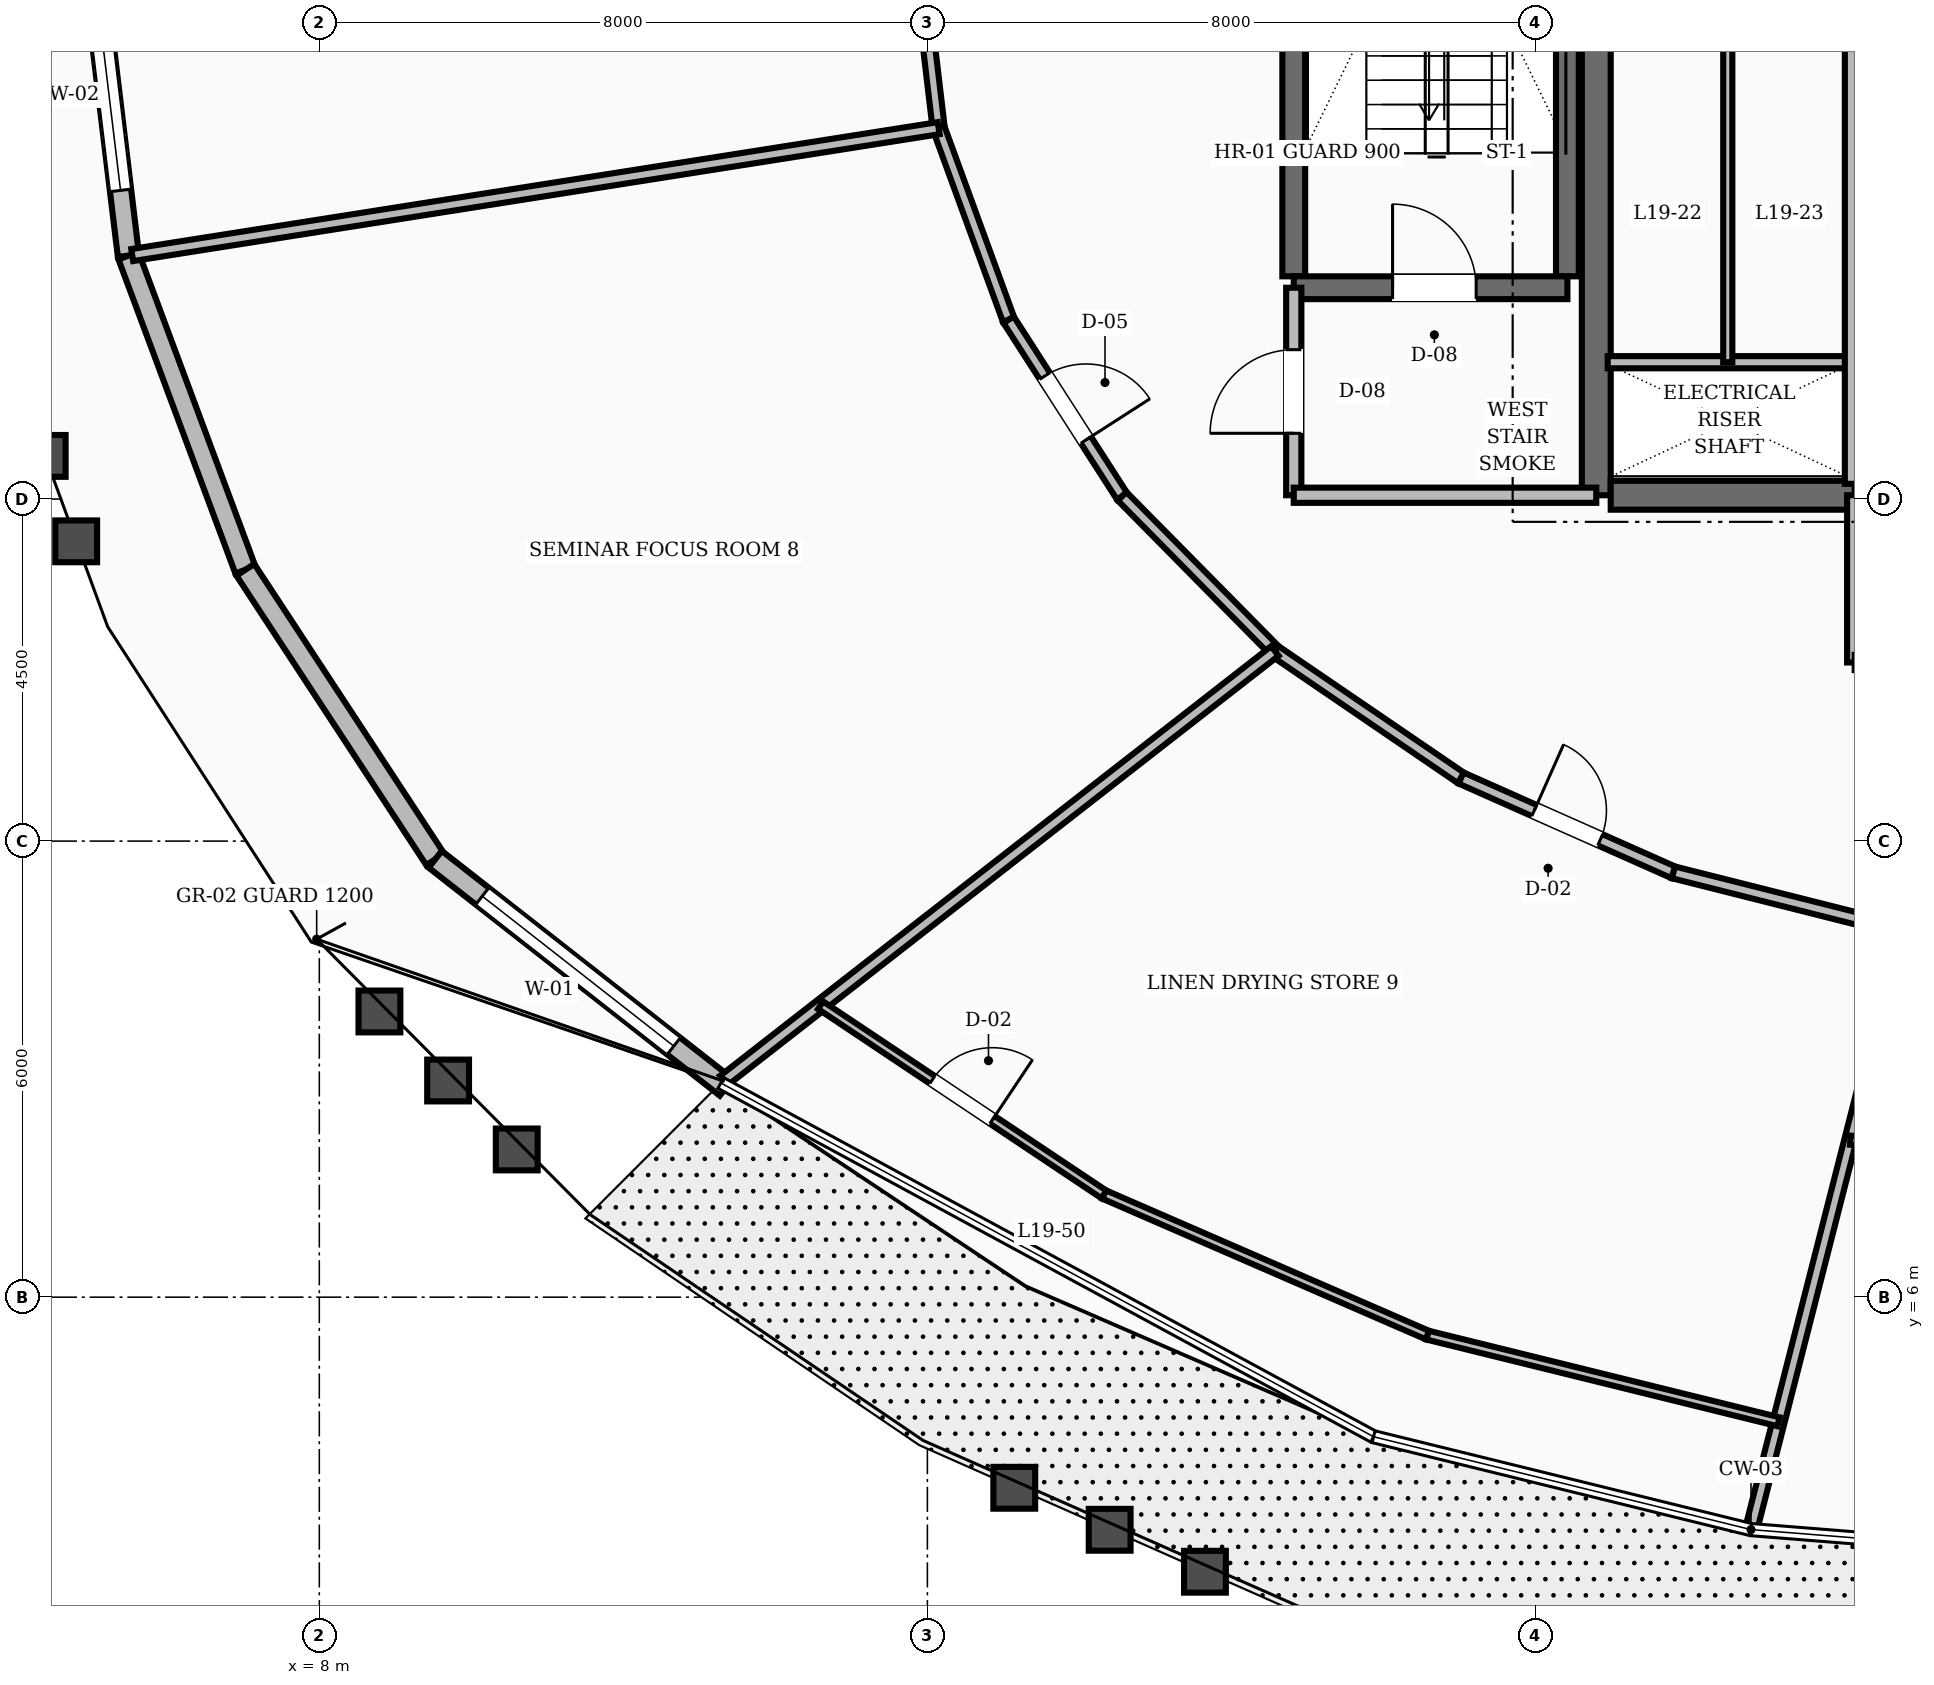
"""IFC4 building model, lengths in metres.
Left out: names, types, materials, properties, quantities, classifications, styles, units other than length and angle.
Written with IfcOpenShell. Run it as: python <this file> out.ifc"""

import sys

from ifc_helpers import new_model, si_unit, direction, frame, frame_2d, origin, place, context, subcontext, project, spatial, rectangle, extrude, element, fill, save


model = new_model("IFC4")
c1 = context("Model", 3, precision=1e-05, world=origin(), true_north=direction((0.0, 1.0)))
c2 = subcontext(c1, "Body", "Model", "MODEL_VIEW")
j1 = project(units=[si_unit("LENGTHUNIT", "METRE"), si_unit("PLANEANGLEUNIT", "RADIAN")], contexts=[c1])
p1 = place(None, origin())
s1 = spatial("IfcSite", under=j1, at=p1, CompositionType="ELEMENT")
p2 = place(p1, origin())
s2 = spatial("IfcBuilding", under=s1, at=p2, CompositionType="ELEMENT")
p3 = place(p2, frame((0.0, 0.0, 77.2)))
s3 = spatial("IfcBuildingStorey", under=s2, at=p3, CompositionType="ELEMENT", Elevation=77.2)
p4 = place(p3, frame((24.8, 16.55, 0.0), z_axis=(0.0, 0.0, 1.0), x_axis=(0.0, 1.0, 0.0)))
e1 = element("IfcWall", 1, at=p4, inside=s3, PredefinedType="SHEAR", context=c2, shape_type="SweptSolid", body=[
    extrude(rectangle(XDim=6.3, YDim=0.38, at=frame_2d((3.15, 0.0))), origin(), (0.0, 0.0, 1.0), 3.6),
])
p5 = place(p3, frame((24.99, 16.55, 0.0), z_axis=(0.0, 0.0, 1.0), x_axis=(1.0, 0.0, 0.0)))
e2 = element("IfcWall", 2, at=p5, inside=s3, PredefinedType="SHEAR", context=c2, shape_type="SweptSolid", body=[
    extrude(rectangle(XDim=3.21, YDim=0.38, at=frame_2d((1.605, 0.0))), origin(), (0.0, 0.0, 1.0), 3.6),
])
for number, where, z_axis, x_axis in (
    (3, (20.82, 19.43, 0.0), (0.0, 0.0, 1.0), (0.0, 1.0, 0.0)),
    (4, (24.42, 19.43, 0.0), (0.0, 0.0, 1.0), (0.0, 1.0, 0.0)),
):
    element("IfcWall", number, at=place(p3, frame(where, z_axis=z_axis, x_axis=x_axis)), inside=s3, PredefinedType="SHEAR", context=c2, shape_type="SweptSolid", body=[
        extrude(rectangle(XDim=8.74, YDim=0.3, at=frame_2d((4.37, 0.0))), origin(), (0.0, 0.0, 1.0), 3.6),
    ])
p6 = place(p3, frame((20.82, 19.28, 0.0), z_axis=(0.0, 0.0, 1.0), x_axis=(1.0, 0.0, 0.0)))
e5 = element("IfcWall", 5, at=p6, inside=s3, PredefinedType="SHEAR", context=c2, shape_type="SweptSolid", body=[
    extrude(rectangle(XDim=3.6, YDim=0.3, at=frame_2d((1.8, 0.0))), origin(), (0.0, 0.0, 1.0), 3.6),
])
p7 = place(p6, frame((1.3, 0.0, 0.0)))
e6 = element("IfcOpeningElement", 6, at=p7, cuts=e5, PredefinedType="OPENING", context=c2, shape_type="SweptSolid", body=[
    extrude(rectangle(XDim=1.1, YDim=2.1, at=frame_2d((0.55, 1.05))), frame((0.0, 0.16, 0.0), z_axis=(0.0, -1.0, 0.0), x_axis=(1.0, 0.0, 0.0)), (0.0, 0.0, 1.0), 0.32),
])
p8 = place(p3, frame((4.969, 24.0, 0.0), z_axis=(0.0, 0.0, 1.0), x_axis=(0.119945698674, -0.992780453761, 0.0)))
e7 = element("IfcWall", 7, at=p8, inside=s3, PredefinedType="STANDARD", context=c2, shape_type="SweptSolid", body=[
    extrude(rectangle(XDim=4.329, YDim=0.28, at=frame_2d((2.165, 0.0))), origin(), (0.0, 0.0, 1.0), 2.71),
])
p9 = place(p8, frame((0.865, 0.0, 0.8)))
e8 = element("IfcOpeningElement", 8, at=p9, cuts=e7, PredefinedType="OPENING", context=c2, shape_type="SweptSolid", body=[
    extrude(rectangle(XDim=2.6, YDim=1.65, at=frame_2d((1.3, 0.825))), frame((0.0, 0.15, 0.0), z_axis=(0.0, -1.0, 0.0), x_axis=(1.0, 0.0, 0.0)), (0.0, 0.0, 1.0), 0.3),
])
p10 = place(p3, frame((5.489, 19.702, 0.0), z_axis=(0.0, 0.0, 1.0), x_axis=(0.348859248306, -0.93717513031, 0.0)))
e9 = element("IfcWall", 9, at=p10, inside=s3, PredefinedType="STANDARD", context=c2, shape_type="SweptSolid", body=[
    extrude(rectangle(XDim=4.41, YDim=0.28, at=frame_2d((2.205, 0.0))), origin(), (0.0, 0.0, 1.0), 2.71),
])
p11 = place(p3, frame((7.027, 15.569, 0.0), z_axis=(0.0, 0.0, 1.0), x_axis=(0.548388300237, -0.836223817027, 0.0)))
e10 = element("IfcWall", 10, at=p11, inside=s3, PredefinedType="STANDARD", context=c2, shape_type="SweptSolid", body=[
    extrude(rectangle(XDim=4.555, YDim=0.28, at=frame_2d((2.277, 0.0))), origin(), (0.0, 0.0, 1.0), 2.71),
])
p12 = place(p3, frame((9.525, 11.76, 0.0), z_axis=(0.0, 0.0, 1.0), x_axis=(0.787323872443, -0.616539633667, 0.0)))
e11 = element("IfcWall", 11, at=p12, inside=s3, PredefinedType="STANDARD", context=c2, shape_type="SweptSolid", body=[
    extrude(rectangle(XDim=4.865, YDim=0.28, at=frame_2d((2.432, 0.0))), origin(), (0.0, 0.0, 1.0), 2.71),
])
p13 = place(p12, frame((0.786, 0.0, 0.8)))
e12 = element("IfcOpeningElement", 12, at=p13, cuts=e11, PredefinedType="OPENING", context=c2, shape_type="SweptSolid", body=[
    extrude(rectangle(XDim=3.2, YDim=1.65, at=frame_2d((1.6, 0.825))), frame((0.0, 0.15, 0.0), z_axis=(0.0, -1.0, 0.0), x_axis=(1.0, 0.0, 0.0)), (0.0, 0.0, 1.0), 0.3),
])
p14 = place(p3, frame((20.82, 16.55, 0.0), z_axis=(0.0, 0.0, 1.0), x_axis=(0.0, 1.0, 0.0)))
e13 = element("IfcWall", 13, at=p14, inside=s3, PredefinedType="SOLIDWALL", context=c2, shape_type="SweptSolid", body=[
    extrude(rectangle(XDim=2.73, YDim=0.2, at=frame_2d((1.365, 0.0))), origin(), (0.0, 0.0, 1.0), 2.71),
])
p15 = place(p14, frame((0.815, 0.0, 0.0)))
e14 = element("IfcOpeningElement", 14, at=p15, cuts=e13, PredefinedType="OPENING", context=c2, shape_type="SweptSolid", body=[
    extrude(rectangle(XDim=1.1, YDim=2.1, at=frame_2d((0.55, 1.05))), frame((0.0, 0.11, 0.0), z_axis=(0.0, -1.0, 0.0), x_axis=(1.0, 0.0, 0.0)), (0.0, 0.0, 1.0), 0.22),
])
p16 = place(p3, frame((20.82, 16.55, 0.0), z_axis=(0.0, 0.0, 1.0), x_axis=(1.0, 0.0, 0.0)))
e15 = element("IfcWall", 15, at=p16, inside=s3, PredefinedType="SOLIDWALL", context=c2, shape_type="SweptSolid", body=[
    extrude(rectangle(XDim=3.98, YDim=0.2, at=frame_2d((1.99, 0.0))), origin(), (0.0, 0.0, 1.0), 2.71),
])
p17 = place(p3, frame((28.2, 14.35, 0.0), z_axis=(0.0, 0.0, 1.0), x_axis=(0.0, 1.0, 0.0)))
e16 = element("IfcWall", 16, at=p17, inside=s3, PredefinedType="SOLIDWALL", context=c2, shape_type="SweptSolid", body=[
    extrude(rectangle(XDim=2.2, YDim=0.2, at=frame_2d((1.1, 0.0))), origin(), (0.0, 0.0, 1.0), 2.71),
])
p18 = place(p3, frame((24.95, 18.3, 0.0), z_axis=(0.0, 0.0, 1.0), x_axis=(1.0, 0.0, 0.0)))
e17 = element("IfcWall", 17, at=p18, inside=s3, PredefinedType="SOLIDWALL", context=c2, shape_type="SweptSolid", body=[
    extrude(rectangle(XDim=3.2, YDim=0.16, at=frame_2d((1.6, 0.0))), origin(), (0.0, 0.0, 1.0), 2.71),
])
p19 = place(p3, frame((28.15, 16.7, 0.0), z_axis=(0.0, 0.0, 1.0), x_axis=(0.0, 1.0, 0.0)))
e18 = element("IfcWall", 18, at=p19, inside=s3, PredefinedType="SOLIDWALL", context=c2, shape_type="SweptSolid", body=[
    extrude(rectangle(XDim=6.05, YDim=0.16, at=frame_2d((3.025, 0.0))), origin(), (0.0, 0.0, 1.0), 2.71),
])
p20 = place(p3, frame((26.53, 18.3, 0.0), z_axis=(0.0, 0.0, 1.0), x_axis=(0.0, 1.0, 0.0)))
e19 = element("IfcWall", 19, at=p20, inside=s3, PredefinedType="PARTITIONING", context=c2, shape_type="SweptSolid", body=[
    extrude(rectangle(XDim=4.45, YDim=0.12, at=frame_2d((2.225, 0.0))), origin(), (0.0, 0.0, 1.0), 2.71),
])
p21 = place(p3, frame((15.838, 24.0, 0.0), z_axis=(0.0, 0.0, 1.0), x_axis=(0.117667763342, -0.993053018459, 0.0)))
e20 = element("IfcWall", 20, at=p21, inside=s3, PredefinedType="SOLIDWALL", context=c2, shape_type="SweptSolid", body=[
    extrude(rectangle(XDim=2.639, YDim=0.16, at=frame_2d((1.32, 0.0))), origin(), (0.0, 0.0, 1.0), 2.71),
])
p22 = place(p3, frame((16.148, 21.379, 0.0), z_axis=(0.0, 0.0, 1.0), x_axis=(0.342882618672, -0.939378257047, 0.0)))
e21 = element("IfcWall", 21, at=p22, inside=s3, PredefinedType="SOLIDWALL", context=c2, shape_type="SweptSolid", body=[
    extrude(rectangle(XDim=2.683, YDim=0.16, at=frame_2d((1.341, 0.0))), origin(), (0.0, 0.0, 1.0), 2.71),
])
p23 = place(p3, frame((17.068, 18.859, 0.0), z_axis=(0.0, 0.0, 1.0), x_axis=(0.540891657444, -0.841092274907, 0.0)))
e22 = element("IfcWall", 22, at=p23, inside=s3, PredefinedType="SOLIDWALL", context=c2, shape_type="SweptSolid", body=[
    extrude(rectangle(XDim=2.761, YDim=0.16, at=frame_2d((1.38, 0.0))), origin(), (0.0, 0.0, 1.0), 2.71),
])
p24 = place(p23, frame((0.881, 0.0, 0.0)))
e23 = element("IfcOpeningElement", 23, at=p24, cuts=e22, PredefinedType="OPENING", context=c2, shape_type="SweptSolid", body=[
    extrude(rectangle(XDim=1.0, YDim=2.1, at=frame_2d((0.5, 1.05))), frame((0.0, 0.09, 0.0), z_axis=(0.0, -1.0, 0.0), x_axis=(1.0, 0.0, 0.0)), (0.0, 0.0, 1.0), 0.18),
])
p25 = place(p3, frame((18.562, 16.537, 0.0), z_axis=(0.0, 0.0, 1.0), x_axis=(0.702569520063, -0.711615113301, 0.0)))
e24 = element("IfcWall", 24, at=p25, inside=s3, PredefinedType="SOLIDWALL", context=c2, shape_type="SweptSolid", body=[
    extrude(rectangle(XDim=2.861, YDim=0.16, at=frame_2d((1.43, 0.0))), origin(), (0.0, 0.0, 1.0), 2.71),
])
p26 = place(p3, frame((20.572, 14.501, 0.0), z_axis=(0.0, 0.0, 1.0), x_axis=(0.826112340767, -0.563505457323, 0.0)))
e25 = element("IfcWall", 25, at=p26, inside=s3, PredefinedType="SOLIDWALL", context=c2, shape_type="SweptSolid", body=[
    extrude(rectangle(XDim=2.965, YDim=0.16, at=frame_2d((1.482, 0.0))), origin(), (0.0, 0.0, 1.0), 2.71),
])
p27 = place(p3, frame((23.021, 12.83, 0.0), z_axis=(0.0, 0.0, 1.0), x_axis=(0.913860932409, -0.406027334321, 0.0)))
e26 = element("IfcWall", 26, at=p27, inside=s3, PredefinedType="SOLIDWALL", context=c2, shape_type="SweptSolid", body=[
    extrude(rectangle(XDim=3.058, YDim=0.16, at=frame_2d((1.529, 0.0))), origin(), (0.0, 0.0, 1.0), 2.71),
])
p28 = place(p27, frame((1.054, 0.0, 0.0)))
e27 = element("IfcOpeningElement", 27, at=p28, cuts=e26, PredefinedType="OPENING", context=c2, shape_type="SweptSolid", body=[
    extrude(rectangle(XDim=0.95, YDim=2.1, at=frame_2d((0.475, 1.05))), frame((0.0, 0.09, 0.0), z_axis=(0.0, -1.0, 0.0), x_axis=(1.0, 0.0, 0.0)), (0.0, 0.0, 1.0), 0.18),
])
p29 = place(p3, frame((25.815, 11.589, 0.0), z_axis=(0.0, 0.0, 1.0), x_axis=(0.969653665365, -0.244482656326, 0.0)))
e28 = element("IfcWall", 28, at=p29, inside=s3, PredefinedType="SOLIDWALL", context=c2, shape_type="SweptSolid", body=[
    extrude(rectangle(XDim=3.127, YDim=0.16, at=frame_2d((1.563, 0.0))), origin(), (0.0, 0.0, 1.0), 2.71),
])
p30 = place(p3, frame((28.847, 10.824, 0.0), z_axis=(0.0, 0.0, 1.0), x_axis=(-0.247229429699, -0.96895696968, 0.0)))
e29 = element("IfcWall", 29, at=p30, inside=s3, PredefinedType="SOLIDWALL", context=c2, shape_type="SweptSolid", body=[
    extrude(rectangle(XDim=8.085, YDim=0.16, at=frame_2d((4.042, 0.0))), origin(), (0.0, 0.0, 1.0), 2.71),
])
p31 = place(p3, frame((28.143, 8.065, 0.0), z_axis=(0.0, 0.0, 1.0), x_axis=(0.996738793215, -0.080695589095, 0.0)))
e30 = element("IfcWall", 30, at=p31, inside=s3, PredefinedType="PARTITIONING", context=c2, shape_type="SweptSolid", body=[
    extrude(rectangle(XDim=3.87, YDim=0.12, at=frame_2d((1.935, 0.0))), origin(), (0.0, 0.0, 1.0), 2.71),
])
p32 = place(p31, frame((1.435, 0.0, 0.0)))
e31 = element("IfcOpeningElement", 31, at=p32, cuts=e30, PredefinedType="OPENING", context=c2, shape_type="SweptSolid", body=[
    extrude(rectangle(XDim=1.0, YDim=2.1, at=frame_2d((0.5, 1.05))), frame((0.0, 0.07, 0.0), z_axis=(0.0, -1.0, 0.0), x_axis=(1.0, 0.0, 0.0)), (0.0, 0.0, 1.0), 0.14),
])
p33 = place(p3, frame((16.148, 21.379, 0.0), z_axis=(0.0, 0.0, 1.0), x_axis=(-0.987847228952, -0.155427964831, 0.0)))
e32 = element("IfcWall", 32, at=p33, inside=s3, PredefinedType="SOLIDWALL", context=c2, shape_type="SweptSolid", body=[
    extrude(rectangle(XDim=10.741, YDim=0.16, at=frame_2d((5.371, 0.0))), origin(), (0.0, 0.0, 1.0), 2.71),
])
p34 = place(p3, frame((20.572, 14.501, 0.0), z_axis=(0.0, 0.0, 1.0), x_axis=(-0.788645247131, -0.61484849693, 0.0)))
e33 = element("IfcWall", 33, at=p34, inside=s3, PredefinedType="SOLIDWALL", context=c2, shape_type="SweptSolid", body=[
    extrude(rectangle(XDim=9.193, YDim=0.16, at=frame_2d((4.596, 0.0))), origin(), (0.0, 0.0, 1.0), 2.71),
])
p35 = place(p3, frame((14.594, 9.841, 0.0), z_axis=(0.0, 0.0, 1.0), x_axis=(0.831698399128, -0.555227676622, 0.0)))
e34 = element("IfcWall", 34, at=p35, inside=s3, PredefinedType="PARTITIONING", context=c2, shape_type="SweptSolid", body=[
    extrude(rectangle(XDim=4.485, YDim=0.12, at=frame_2d((2.243, 0.0))), origin(), (0.0, 0.0, 1.0), 2.71),
])
p36 = place(p35, frame((1.767, 0.0, 0.0)))
e35 = element("IfcOpeningElement", 35, at=p36, cuts=e34, PredefinedType="OPENING", context=c2, shape_type="SweptSolid", body=[
    extrude(rectangle(XDim=0.95, YDim=2.1, at=frame_2d((0.475, 1.05))), frame((0.0, 0.07, 0.0), z_axis=(0.0, -1.0, 0.0), x_axis=(1.0, 0.0, 0.0)), (0.0, 0.0, 1.0), 0.14),
])
p37 = place(p3, frame((18.325, 7.351, 0.0), z_axis=(0.0, 0.0, 1.0), x_axis=(0.917055835766, -0.39875881694, 0.0)))
e36 = element("IfcWall", 36, at=p37, inside=s3, PredefinedType="PARTITIONING", context=c2, shape_type="SweptSolid", body=[
    extrude(rectangle(XDim=4.64, YDim=0.12, at=frame_2d((2.32, 0.0))), origin(), (0.0, 0.0, 1.0), 2.71),
])
p38 = place(p3, frame((22.58, 5.5, 0.0), z_axis=(0.0, 0.0, 1.0), x_axis=(0.970880744856, -0.239563309519, 0.0)))
e37 = element("IfcWall", 37, at=p38, inside=s3, PredefinedType="PARTITIONING", context=c2, shape_type="SweptSolid", body=[
    extrude(rectangle(XDim=4.756, YDim=0.12, at=frame_2d((2.378, 0.0))), origin(), (0.0, 0.0, 1.0), 2.71),
])
p39 = place(p9, origin())
e38 = element("IfcWindow", 38, at=p39, inside=s3, PartitioningType="SINGLE_PANEL", PredefinedType="WINDOW", context=c2, shape_type="SweptSolid", body=[
    extrude(rectangle(XDim=2.6, YDim=1.65, at=frame_2d((1.3, 0.825))), frame((0.0, 0.03, 0.0), z_axis=(0.0, -1.0, 0.0), x_axis=(1.0, 0.0, 0.0)), (0.0, 0.0, 1.0), 0.06),
])
fill(e8, e38)
p40 = place(p13, origin())
e39 = element("IfcWindow", 39, at=p40, inside=s3, PartitioningType="SINGLE_PANEL", PredefinedType="WINDOW", context=c2, shape_type="SweptSolid", body=[
    extrude(rectangle(XDim=3.2, YDim=1.65, at=frame_2d((1.6, 0.825))), frame((0.0, 0.03, 0.0), z_axis=(0.0, -1.0, 0.0), x_axis=(1.0, 0.0, 0.0)), (0.0, 0.0, 1.0), 0.06),
])
fill(e12, e39)
p41 = place(p7, origin())
e40 = element("IfcDoor", 40, at=p41, inside=s3, OperationType="SINGLE_SWING_LEFT", PredefinedType="DOOR", context=c2, shape_type="SweptSolid", body=[
    extrude(rectangle(XDim=1.1, YDim=2.1, at=frame_2d((0.55, 1.05))), frame((0.0, 0.025, 0.0), z_axis=(0.0, -1.0, 0.0), x_axis=(1.0, 0.0, 0.0)), (0.0, 0.0, 1.0), 0.05),
])
fill(e6, e40)
p42 = place(p15, origin())
e41 = element("IfcDoor", 41, at=p42, inside=s3, OperationType="SINGLE_SWING_LEFT", PredefinedType="DOOR", context=c2, shape_type="SweptSolid", body=[
    extrude(rectangle(XDim=1.1, YDim=2.1, at=frame_2d((0.55, 1.05))), frame((0.0, 0.025, 0.0), z_axis=(0.0, -1.0, 0.0), x_axis=(1.0, 0.0, 0.0)), (0.0, 0.0, 1.0), 0.05),
])
fill(e14, e41)
p43 = place(p24, origin())
e42 = element("IfcDoor", 42, at=p43, inside=s3, OperationType="SINGLE_SWING_RIGHT", PredefinedType="DOOR", context=c2, shape_type="SweptSolid", body=[
    extrude(rectangle(XDim=1.0, YDim=2.1, at=frame_2d((0.5, 1.05))), frame((0.0, 0.025, 0.0), z_axis=(0.0, -1.0, 0.0), x_axis=(1.0, 0.0, 0.0)), (0.0, 0.0, 1.0), 0.05),
])
fill(e23, e42)
p44 = place(p28, origin())
e43 = element("IfcDoor", 43, at=p44, inside=s3, OperationType="SINGLE_SWING_LEFT", PredefinedType="DOOR", context=c2, shape_type="SweptSolid", body=[
    extrude(rectangle(XDim=0.95, YDim=2.1, at=frame_2d((0.475, 1.05))), frame((0.0, 0.025, 0.0), z_axis=(0.0, -1.0, 0.0), x_axis=(1.0, 0.0, 0.0)), (0.0, 0.0, 1.0), 0.05),
])
fill(e27, e43)
p45 = place(p36, origin())
e44 = element("IfcDoor", 44, at=p45, inside=s3, OperationType="SINGLE_SWING_RIGHT", PredefinedType="DOOR", context=c2, shape_type="SweptSolid", body=[
    extrude(rectangle(XDim=0.95, YDim=2.1, at=frame_2d((0.475, 1.05))), frame((0.0, 0.025, 0.0), z_axis=(0.0, -1.0, 0.0), x_axis=(1.0, 0.0, 0.0)), (0.0, 0.0, 1.0), 0.05),
])
fill(e35, e44)
save(model, sys.argv[1])
